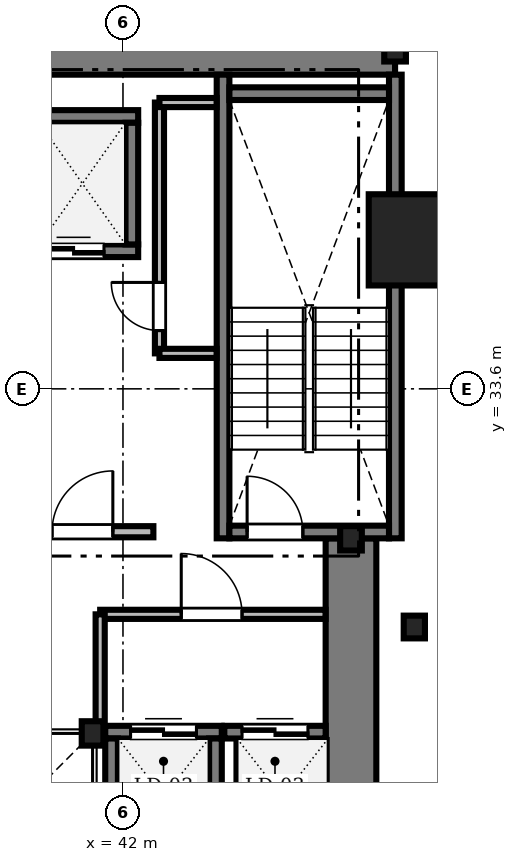
"""IFC4 building model, lengths in metres.
Left out: names, types, materials, properties, quantities, classifications, styles, units other than length and angle.
Written with IfcOpenShell. Run it as: python <this file> out.ifc"""

import sys

from ifc_helpers import new_model, si_unit, direction, frame, frame_2d, origin, origin_2d, place, context, subcontext, project, spatial, rectangle, i_section, extrude, source, transform, mapped, element, fill, save


model = new_model("IFC4")
c1 = context("Model", 3, precision=1e-05, world=origin(), true_north=direction((0.0, 1.0)))
c2 = subcontext(c1, "Body", "Model", "MODEL_VIEW")
j1 = project(units=[si_unit("LENGTHUNIT", "METRE"), si_unit("PLANEANGLEUNIT", "RADIAN")], contexts=[c1])
p1 = place(None, origin())
s1 = spatial("IfcSite", under=j1, at=p1, CompositionType="ELEMENT")
p2 = place(p1, origin())
s2 = spatial("IfcBuilding", under=s1, at=p2, CompositionType="ELEMENT")
p3 = place(p2, frame((0.0, 0.0, 75.05)))
s3 = spatial("IfcBuildingStorey", under=s2, at=p3, CompositionType="ELEMENT", Elevation=75.05)
m1 = source(origin(), c2, "Body", "SweptSolid", [
    extrude(rectangle(XDim=17.52, YDim=1.0, at=frame_2d((8.76, 0.0))), origin(), (0.0, 0.0, 1.0), 3.41),
])
p4 = place(p3, frame((29.85, 40.3, 0.0), z_axis=(0.0, 0.0, 1.0), x_axis=(1.0, 0.0, 0.0)))
e1 = element("IfcWall", 1, at=p4, inside=s3, PredefinedType="SHEAR", context=c2, shape_type="MappedRepresentation", body=[
    mapped(m1, transform((0.0, 0.0, 0.0), scale=1.0)),
])
m2 = source(origin(), c2, "Body", "SweptSolid", [
    extrude(rectangle(XDim=13.15, YDim=1.0, at=frame_2d((6.575, 0.0))), origin(), (0.0, 0.0, 1.0), 3.41),
])
p5 = place(p3, frame((46.5, 17.5, 0.0), z_axis=(0.0, 0.0, 1.0), x_axis=(0.0, 1.0, 0.0)))
e2 = element("IfcWall", 2, at=p5, inside=s3, PredefinedType="SHEAR", context=c2, shape_type="MappedRepresentation", body=[
    mapped(m2, transform((0.0, 0.0, 0.0), scale=1.0)),
])
m3 = source(origin(), c2, "Body", "SweptSolid", [
    extrude(i_section(OverallWidth=0.428, OverallDepth=0.481, WebThickness=0.04, FlangeThickness=0.063, FilletRadius=0.015, at=origin_2d()), origin(), (0.0, 0.0, 1.0), 3.41),
])
for number, where, z_axis, x_axis in (
    (3, (41.4, 26.8, 0.0), (0.0, 0.0, 1.0), (1.0, 0.0, 0.0)),
    (4, (46.5, 30.65, 0.0), (0.0, 0.0, 1.0), (1.0, 0.0, 0.0)),
    (5, (47.37, 40.3, 0.0), (0.0, 0.0, 1.0), (1.0, 0.0, 0.0)),
):
    element("IfcColumn", number, at=place(p3, frame(where, z_axis=z_axis, x_axis=x_axis)), inside=s3, PredefinedType="COLUMN", context=c2, shape_type="MappedRepresentation", body=[
        mapped(m3, transform((0.0, 0.0, 0.0), scale=1.0)),
    ])
m4 = source(origin(), c2, "Body", "SweptSolid", [
    extrude(rectangle(XDim=1.8, YDim=1.8, at=origin_2d()), origin(), (0.0, 0.0, 1.0), 3.41),
])
p6 = place(p3, frame((47.75, 36.54, 0.0), z_axis=(0.0, 0.0, 1.0), x_axis=(1.0, 0.0, 0.0)))
e6 = element("IfcColumn", 6, at=p6, inside=s3, PredefinedType="COLUMN", context=c2, shape_type="MappedRepresentation", body=[
    mapped(m4, transform((0.0, 0.0, 0.0), scale=1.0)),
])
m5 = source(origin(), c2, "Body", "SweptSolid", [
    extrude(i_section(OverallWidth=0.419, OverallDepth=0.449, WebThickness=0.031, FlangeThickness=0.048, FilletRadius=0.015, at=origin_2d()), origin(), (0.0, 0.0, 1.0), 3.41),
])
p7 = place(p3, frame((47.75, 28.9, 0.0), z_axis=(0.0, 0.0, 1.0), x_axis=(1.0, 0.0, 0.0)))
e7 = element("IfcColumn", 7, at=p7, inside=s3, PredefinedType="COLUMN", context=c2, shape_type="MappedRepresentation", body=[
    mapped(m5, transform((0.0, 0.0, 0.0), scale=1.0)),
])
m6 = source(origin(), c2, "Body", "SweptSolid", [
    extrude(rectangle(XDim=9.15, YDim=0.25, at=frame_2d((4.575, 0.0))), origin(), (0.0, 0.0, 1.0), 3.45),
])
for number, where, z_axis, x_axis in (
    (8, (43.975, 30.65, 0.0), (0.0, 0.0, 1.0), (0.0, 1.0, 0.0)),
    (9, (47.375, 30.65, 0.0), (0.0, 0.0, 1.0), (0.0, 1.0, 0.0)),
):
    element("IfcWall", number, at=place(p3, frame(where, z_axis=z_axis, x_axis=x_axis)), inside=s3, PredefinedType="SOLIDWALL", context=c2, shape_type="MappedRepresentation", body=[
        mapped(m6, transform((0.0, 0.0, 0.0), scale=1.0)),
    ])
m7 = source(origin(), c2, "Body", "SweptSolid", [
    extrude(rectangle(XDim=3.15, YDim=0.25, at=frame_2d((1.575, 0.0))), origin(), (0.0, 0.0, 1.0), 3.45),
])
p8 = place(p3, frame((44.1, 39.425, 0.0), z_axis=(0.0, 0.0, 1.0), x_axis=(1.0, 0.0, 0.0)))
e10 = element("IfcWall", 10, at=p8, inside=s3, PredefinedType="SOLIDWALL", context=c2, shape_type="MappedRepresentation", body=[
    mapped(m7, transform((0.0, 0.0, 0.0), scale=1.0)),
])
p9 = place(p3, frame((44.1, 30.775, 0.0), z_axis=(0.0, 0.0, 1.0), x_axis=(1.0, 0.0, 0.0)))
e11 = element("IfcWall", 11, at=p9, inside=s3, PredefinedType="SOLIDWALL", context=c2, shape_type="MappedRepresentation", body=[
    mapped(m7, transform((0.0, 0.0, 0.0), scale=1.0)),
])
m8 = source(origin(), c2, "Body", "SweptSolid", [
    extrude(rectangle(XDim=1.1, YDim=2.2, at=frame_2d((0.55, 1.1))), frame((0.0, 0.135, 0.0), z_axis=(0.0, -1.0, 0.0), x_axis=(1.0, 0.0, 0.0)), (0.0, 0.0, 1.0), 0.27),
])
p10 = place(p9, frame((0.35, 0.0, 0.0)))
e12 = element("IfcOpeningElement", 12, at=p10, cuts=e11, PredefinedType="OPENING", context=c2, shape_type="MappedRepresentation", body=[
    mapped(m8, transform((0.0, 0.0, 0.0), scale=1.0)),
])
m9 = source(origin(), c2, "Body", "SweptSolid", [
    extrude(rectangle(XDim=2.8, YDim=0.22, at=frame_2d((1.4, 0.0))), origin(), (0.0, 0.0, 1.0), 3.41),
])
p11 = place(p3, frame((39.8, 30.78, 0.0), z_axis=(0.0, 0.0, 1.0), x_axis=(1.0, 0.0, 0.0)))
e13 = element("IfcWall", 13, at=p11, inside=s3, PredefinedType="SOLIDWALL", context=c2, shape_type="MappedRepresentation", body=[
    mapped(m9, transform((0.0, 0.0, 0.0), scale=1.0)),
])
m10 = source(origin(), c2, "Body", "SweptSolid", [
    extrude(rectangle(XDim=1.2, YDim=2.2, at=frame_2d((0.6, 1.1))), frame((0.0, 0.12, 0.0), z_axis=(0.0, -1.0, 0.0), x_axis=(1.0, 0.0, 0.0)), (0.0, 0.0, 1.0), 0.24),
])
p12 = place(p11, frame((0.8, 0.0, 0.0)))
e14 = element("IfcOpeningElement", 14, at=p12, cuts=e13, PredefinedType="OPENING", context=c2, shape_type="MappedRepresentation", body=[
    mapped(m10, transform((0.0, 0.0, 0.0), scale=1.0)),
])
m11 = source(origin(), c2, "Body", "SweptSolid", [
    extrude(rectangle(XDim=2.55, YDim=0.25, at=frame_2d((1.275, 0.0))), origin(), (0.0, 0.0, 1.0), 3.41),
])
p13 = place(p3, frame((39.75, 36.325, 0.0), z_axis=(0.0, 0.0, 1.0), x_axis=(1.0, 0.0, 0.0)))
e15 = element("IfcWall", 15, at=p13, inside=s3, PredefinedType="SOLIDWALL", context=c2, shape_type="MappedRepresentation", body=[
    mapped(m11, transform((0.0, 0.0, 0.0), scale=1.0)),
])
m12 = source(origin(), c2, "Body", "SweptSolid", [
    extrude(rectangle(XDim=1.2, YDim=2.25, at=frame_2d((0.6, 1.125))), frame((0.0, 0.135, 0.0), z_axis=(0.0, -1.0, 0.0), x_axis=(1.0, 0.0, 0.0)), (0.0, 0.0, 1.0), 0.27),
])
p14 = place(p13, frame((0.675, 0.0, 0.0)))
e16 = element("IfcOpeningElement", 16, at=p14, cuts=e15, PredefinedType="OPENING", context=c2, shape_type="MappedRepresentation", body=[
    mapped(m12, transform((0.0, 0.0, 0.0), scale=1.0)),
])
p15 = place(p3, frame((39.75, 38.975, 0.0), z_axis=(0.0, 0.0, 1.0), x_axis=(1.0, 0.0, 0.0)))
e17 = element("IfcWall", 17, at=p15, inside=s3, PredefinedType="SOLIDWALL", context=c2, shape_type="MappedRepresentation", body=[
    mapped(m11, transform((0.0, 0.0, 0.0), scale=1.0)),
])
m13 = source(origin(), c2, "Body", "SweptSolid", [
    extrude(rectangle(XDim=2.4, YDim=0.25, at=frame_2d((1.2, 0.0))), origin(), (0.0, 0.0, 1.0), 3.41),
])
p16 = place(p3, frame((42.175, 36.45, 0.0), z_axis=(0.0, 0.0, 1.0), x_axis=(0.0, 1.0, 0.0)))
e18 = element("IfcWall", 18, at=p16, inside=s3, PredefinedType="SOLIDWALL", context=c2, shape_type="MappedRepresentation", body=[
    mapped(m13, transform((0.0, 0.0, 0.0), scale=1.0)),
])
m14 = source(origin(), c2, "Body", "SweptSolid", [
    extrude(rectangle(XDim=2.3, YDim=0.25, at=frame_2d((1.15, 0.0))), origin(), (0.0, 0.0, 1.0), 3.41),
])
p17 = place(p3, frame((41.65, 26.825, 0.0), z_axis=(0.0, 0.0, 1.0), x_axis=(1.0, 0.0, 0.0)))
e19 = element("IfcWall", 19, at=p17, inside=s3, PredefinedType="SOLIDWALL", context=c2, shape_type="MappedRepresentation", body=[
    mapped(m14, transform((0.0, 0.0, 0.0), scale=1.0)),
])
m15 = source(origin(), c2, "Body", "SweptSolid", [
    extrude(rectangle(XDim=1.3, YDim=2.3, at=frame_2d((0.65, 1.15))), frame((0.0, 0.135, 0.0), z_axis=(0.0, -1.0, 0.0), x_axis=(1.0, 0.0, 0.0)), (0.0, 0.0, 1.0), 0.27),
])
p18 = place(p17, frame((0.5, 0.0, 0.0)))
e20 = element("IfcOpeningElement", 20, at=p18, cuts=e19, PredefinedType="OPENING", context=c2, shape_type="MappedRepresentation", body=[
    mapped(m15, transform((0.0, 0.0, 0.0), scale=1.0)),
])
for number, where, z_axis, x_axis in (
    (21, (41.775, 24.4, 0.0), (0.0, 0.0, 1.0), (0.0, 1.0, 0.0)),
    (22, (43.825, 24.4, 0.0), (0.0, 0.0, 1.0), (0.0, 1.0, 0.0)),
):
    element("IfcWall", number, at=place(p3, frame(where, z_axis=z_axis, x_axis=x_axis)), inside=s3, PredefinedType="SOLIDWALL", context=c2, shape_type="MappedRepresentation", body=[
        mapped(m14, transform((0.0, 0.0, 0.0), scale=1.0)),
    ])
m16 = source(origin(), c2, "Body", "SweptSolid", [
    extrude(rectangle(XDim=2.0, YDim=0.25, at=frame_2d((1.0, 0.0))), origin(), (0.0, 0.0, 1.0), 3.41),
])
p19 = place(p3, frame((44.0, 26.825, 0.0), z_axis=(0.0, 0.0, 1.0), x_axis=(1.0, 0.0, 0.0)))
e23 = element("IfcWall", 23, at=p19, inside=s3, PredefinedType="SOLIDWALL", context=c2, shape_type="MappedRepresentation", body=[
    mapped(m16, transform((0.0, 0.0, 0.0), scale=1.0)),
])
p20 = place(p19, frame((0.35, 0.0, 0.0)))
e24 = element("IfcOpeningElement", 24, at=p20, cuts=e23, PredefinedType="OPENING", context=c2, shape_type="MappedRepresentation", body=[
    mapped(m15, transform((0.0, 0.0, 0.0), scale=1.0)),
])
m17 = source(origin(), c2, "Body", "SweptSolid", [
    extrude(rectangle(XDim=4.95, YDim=0.18, at=frame_2d((2.475, 0.0))), origin(), (0.0, 0.0, 1.0), 3.41),
])
p21 = place(p3, frame((42.72, 34.3, 0.0), z_axis=(0.0, 0.0, 1.0), x_axis=(0.0, 1.0, 0.0)))
e25 = element("IfcWall", 25, at=p21, inside=s3, PredefinedType="PARTITIONING", context=c2, shape_type="MappedRepresentation", body=[
    mapped(m17, transform((0.0, 0.0, 0.0), scale=1.0)),
])
m18 = source(origin(), c2, "Body", "SweptSolid", [
    extrude(rectangle(XDim=0.95, YDim=2.15, at=frame_2d((0.475, 1.075))), frame((0.0, 0.1, 0.0), z_axis=(0.0, -1.0, 0.0), x_axis=(1.0, 0.0, 0.0)), (0.0, 0.0, 1.0), 0.2),
])
p22 = place(p21, frame((0.45, 0.0, 0.0)))
e26 = element("IfcOpeningElement", 26, at=p22, cuts=e25, PredefinedType="OPENING", context=c2, shape_type="MappedRepresentation", body=[
    mapped(m18, transform((0.0, 0.0, 0.0), scale=1.0)),
])
m19 = source(origin(), c2, "Body", "SweptSolid", [
    extrude(rectangle(XDim=4.448, YDim=0.18, at=frame_2d((2.224, 0.0))), origin(), (0.0, 0.0, 1.0), 3.042),
])
p23 = place(p3, frame((41.55, 29.15, 0.0), z_axis=(0.0, 0.0, 1.0), x_axis=(1.0, 0.0, 0.0)))
e27 = element("IfcWall", 27, at=p23, inside=s3, PredefinedType="PARTITIONING", context=c2, shape_type="MappedRepresentation", body=[
    mapped(m19, transform((0.0, 0.0, 0.0), scale=1.0)),
])
m20 = source(origin(), c2, "Body", "SweptSolid", [
    extrude(rectangle(XDim=1.2, YDim=2.2, at=frame_2d((0.6, 1.1))), frame((0.0, 0.1, 0.0), z_axis=(0.0, -1.0, 0.0), x_axis=(1.0, 0.0, 0.0)), (0.0, 0.0, 1.0), 0.2),
])
p24 = place(p23, frame((1.6, 0.0, 0.0)))
e28 = element("IfcOpeningElement", 28, at=p24, cuts=e27, PredefinedType="OPENING", context=c2, shape_type="MappedRepresentation", body=[
    mapped(m20, transform((0.0, 0.0, 0.0), scale=1.0)),
])
m21 = source(origin(), c2, "Body", "SweptSolid", [
    extrude(rectangle(XDim=2.35, YDim=0.18, at=frame_2d((1.175, 0.0))), origin(), (0.0, 0.0, 1.0), 2.802),
])
p25 = place(p3, frame((41.55, 26.8, 0.0), z_axis=(0.0, 0.0, 1.0), x_axis=(0.0, 1.0, 0.0)))
e29 = element("IfcWall", 29, at=p25, inside=s3, PredefinedType="PARTITIONING", context=c2, shape_type="MappedRepresentation", body=[
    mapped(m21, transform((0.0, 0.0, 0.0), scale=1.0)),
])
m22 = source(origin(), c2, "Body", "SweptSolid", [
    extrude(rectangle(XDim=1.128, YDim=0.18, at=frame_2d((0.564, 0.0))), origin(), (0.0, 0.0, 1.0), 3.41),
])
for number, where, z_axis, x_axis in (
    (30, (42.72, 34.3, 0.0), (0.0, 0.0, 1.0), (1.0, 0.0, 0.0)),
    (31, (42.72, 39.25, 0.0), (0.0, 0.0, 1.0), (1.0, 0.0, 0.0)),
):
    element("IfcWall", number, at=place(p3, frame(where, z_axis=z_axis, x_axis=x_axis)), inside=s3, PredefinedType="PARTITIONING", context=c2, shape_type="MappedRepresentation", body=[
        mapped(m22, transform((0.0, 0.0, 0.0), scale=1.0)),
    ])
m23 = source(origin(), c2, "Body", "SweptSolid", [
    extrude(rectangle(XDim=1.1, YDim=2.2, at=frame_2d((0.55, 1.1))), frame((0.0, 0.025, 0.0), z_axis=(0.0, -1.0, 0.0), x_axis=(1.0, 0.0, 0.0)), (0.0, 0.0, 1.0), 0.05),
])
p26 = place(p10, origin())
e32 = element("IfcDoor", 32, at=p26, inside=s3, OperationType="SINGLE_SWING_LEFT", PredefinedType="DOOR", context=c2, shape_type="MappedRepresentation", body=[
    mapped(m23, transform((0.0, 0.0, 0.0), scale=1.0)),
])
fill(e12, e32)
m24 = source(origin(), c2, "Body", "SweptSolid", [
    extrude(rectangle(XDim=1.2, YDim=2.2, at=frame_2d((0.6, 1.1))), frame((0.0, 0.025, 0.0), z_axis=(0.0, -1.0, 0.0), x_axis=(1.0, 0.0, 0.0)), (0.0, 0.0, 1.0), 0.05),
])
p27 = place(p12, origin())
e33 = element("IfcDoor", 33, at=p27, inside=s3, OperationType="SINGLE_SWING_RIGHT", PredefinedType="DOOR", context=c2, shape_type="MappedRepresentation", body=[
    mapped(m24, transform((0.0, 0.0, 0.0), scale=1.0)),
])
fill(e14, e33)
m25 = source(origin(), c2, "Body", "SweptSolid", [
    extrude(rectangle(XDim=1.2, YDim=2.25, at=frame_2d((0.6, 1.125))), frame((0.0, 0.025, 0.0), z_axis=(0.0, -1.0, 0.0), x_axis=(1.0, 0.0, 0.0)), (0.0, 0.0, 1.0), 0.05),
])
p28 = place(p14, origin())
e34 = element("IfcDoor", 34, at=p28, inside=s3, OperationType="DOUBLE_DOOR_SLIDING", PredefinedType="DOOR", context=c2, shape_type="MappedRepresentation", body=[
    mapped(m25, transform((0.0, 0.0, 0.0), scale=1.0)),
])
fill(e16, e34)
m26 = source(origin(), c2, "Body", "SweptSolid", [
    extrude(rectangle(XDim=1.3, YDim=2.3, at=frame_2d((0.65, 1.15))), frame((0.0, 0.025, 0.0), z_axis=(0.0, -1.0, 0.0), x_axis=(1.0, 0.0, 0.0)), (0.0, 0.0, 1.0), 0.05),
])
p29 = place(p18, origin())
e35 = element("IfcDoor", 35, at=p29, inside=s3, OperationType="DOUBLE_DOOR_SLIDING", PredefinedType="DOOR", context=c2, shape_type="MappedRepresentation", body=[
    mapped(m26, transform((0.0, 0.0, 0.0), scale=1.0)),
])
fill(e20, e35)
p30 = place(p20, origin())
e36 = element("IfcDoor", 36, at=p30, inside=s3, OperationType="DOUBLE_DOOR_SLIDING", PredefinedType="DOOR", context=c2, shape_type="MappedRepresentation", body=[
    mapped(m26, transform((0.0, 0.0, 0.0), scale=1.0)),
])
fill(e24, e36)
m27 = source(origin(), c2, "Body", "SweptSolid", [
    extrude(rectangle(XDim=0.95, YDim=2.15, at=frame_2d((0.475, 1.075))), frame((0.0, 0.025, 0.0), z_axis=(0.0, -1.0, 0.0), x_axis=(1.0, 0.0, 0.0)), (0.0, 0.0, 1.0), 0.05),
])
p31 = place(p22, origin())
e37 = element("IfcDoor", 37, at=p31, inside=s3, OperationType="SINGLE_SWING_RIGHT", PredefinedType="DOOR", context=c2, shape_type="MappedRepresentation", body=[
    mapped(m27, transform((0.0, 0.0, 0.0), scale=1.0)),
])
fill(e26, e37)
p32 = place(p24, origin())
e38 = element("IfcDoor", 38, at=p32, inside=s3, OperationType="SINGLE_SWING_LEFT", PredefinedType="DOOR", context=c2, shape_type="MappedRepresentation", body=[
    mapped(m24, transform((0.0, 0.0, 0.0), scale=1.0)),
])
fill(e28, e38)
save(model, sys.argv[1])
